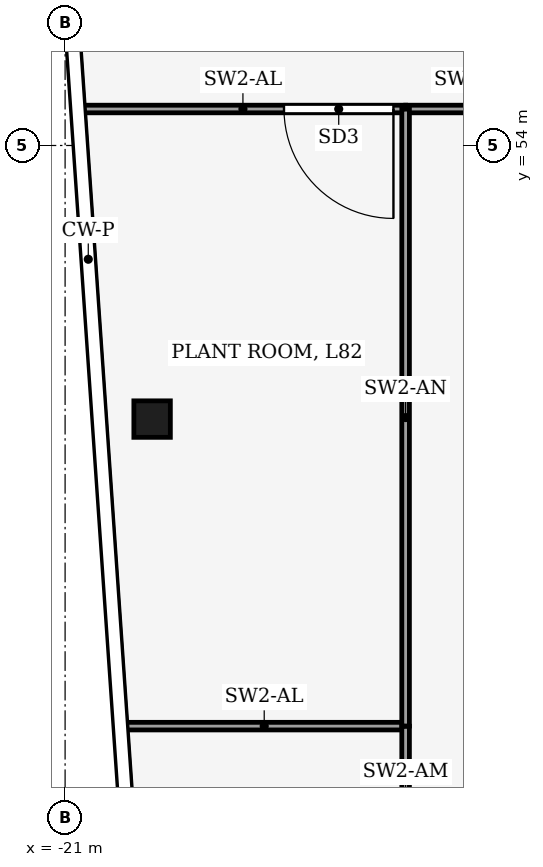
"""IFC4 building model, lengths in metres.
Left out: names, types, materials, properties, quantities, classifications, styles, units other than length and angle.
Written with IfcOpenShell. Run it as: python <this file> out.ifc"""

import sys

from ifc_helpers import new_model, si_unit, direction, frame, frame_2d, origin, origin_2d, place, context, subcontext, project, spatial, rectangle, hollow_rectangle, extrude, element, fill, save


model = new_model("IFC4")
c1 = context("Model", 3, precision=1e-05, world=origin(), true_north=direction((0.0, 1.0)))
c2 = subcontext(c1, "Body", "Model", "MODEL_VIEW")
j1 = project(units=[si_unit("LENGTHUNIT", "METRE"), si_unit("PLANEANGLEUNIT", "RADIAN")], contexts=[c1])
p1 = place(None, origin())
s1 = spatial("IfcSite", under=j1, at=p1, CompositionType="ELEMENT")
p2 = place(p1, origin())
s2 = spatial("IfcBuilding", under=s1, at=p2, CompositionType="ELEMENT")
p3 = place(p2, frame((0.0, 0.0, 364.0)))
s3 = spatial("IfcBuildingStorey", under=s2, at=p3, CompositionType="ELEMENT", Elevation=364.0)
p4 = place(p3, frame((-19.569, 49.5, 0.0), z_axis=(0.0, 0.0, 1.0), x_axis=(1.0, 0.0, 0.0)))
e1 = element("IfcColumn", 1, at=p4, inside=s3, PredefinedType="COLUMN", context=c2, shape_type="SweptSolid", body=[
    extrude(hollow_rectangle(XDim=0.6, YDim=0.6, WallThickness=0.025, at=origin_2d()), origin(), (0.0, 0.0, 1.0), 4.0),
])
p5 = place(p3, frame((-15.4, 54.6, 0.0), z_axis=(0.0, 0.0, 1.0), x_axis=(-1.0, 0.0, 0.0)))
e2 = element("IfcWall", 2, at=p5, inside=s3, PredefinedType="PARTITIONING", context=c2, shape_type="SweptSolid", body=[
    extrude(rectangle(XDim=5.351, YDim=0.125, at=frame_2d((2.675, 0.0))), origin(), (0.0, 0.0, 1.0), 3.02),
])
p6 = place(p5, frame((0.2, 0.0, 0.0)))
e3 = element("IfcOpeningElement", 3, at=p6, cuts=e2, PredefinedType="OPENING", context=c2, shape_type="SweptSolid", body=[
    extrude(rectangle(XDim=1.8, YDim=2.4, at=frame_2d((0.9, 1.2))), frame((0.0, 0.073, 0.0), z_axis=(0.0, -1.0, 0.0), x_axis=(1.0, 0.0, 0.0)), (0.0, 0.0, 1.0), 0.145),
])
p7 = place(p3, frame((-20.051, 44.45, 0.0), z_axis=(0.0, 0.0, 1.0), x_axis=(1.0, 0.0, 0.0)))
e4 = element("IfcWall", 4, at=p7, inside=s3, PredefinedType="PARTITIONING", context=c2, shape_type="SweptSolid", body=[
    extrude(rectangle(XDim=4.651, YDim=0.125, at=frame_2d((2.325, 0.0))), origin(), (0.0, 0.0, 1.0), 3.02),
])
p8 = place(p3, frame((-13.062, 54.6, 0.0), z_axis=(0.0, 0.0, 1.0), x_axis=(-1.0, 0.0, 0.0)))
e5 = element("IfcWall", 5, at=p8, inside=s3, PredefinedType="PARTITIONING", context=c2, shape_type="SweptSolid", body=[
    extrude(rectangle(XDim=2.335, YDim=0.125, at=frame_2d((1.168, 0.0))), origin(), (0.0, 0.0, 1.0), 3.85),
])
p9 = place(p3, frame((-15.4, 44.448, 0.0), z_axis=(0.0, 0.0, 1.0), x_axis=(0.0, -1.0, 0.0)))
e6 = element("IfcWall", 6, at=p9, inside=s3, PredefinedType="PARTITIONING", context=c2, shape_type="SweptSolid", body=[
    extrude(rectangle(XDim=2.446, YDim=0.125, at=frame_2d((1.223, 0.0))), origin(), (0.0, 0.0, 1.0), 3.85),
])
p10 = place(p3, frame((-15.4, 54.598, 0.0), z_axis=(0.0, 0.0, 1.0), x_axis=(0.0, -1.0, 0.0)))
e7 = element("IfcWall", 7, at=p10, inside=s3, PredefinedType="PARTITIONING", context=c2, shape_type="SweptSolid", body=[
    extrude(rectangle(XDim=10.146, YDim=0.125, at=frame_2d((5.073, 0.0))), origin(), (0.0, 0.0, 1.0), 3.33),
])
p11 = place(p6, origin())
e8 = element("IfcDoor", 8, at=p11, inside=s3, OperationType="DOUBLE_DOOR_SINGLE_SWING", PredefinedType="DOOR", context=c2, shape_type="SweptSolid", body=[
    extrude(rectangle(XDim=1.8, YDim=2.4, at=frame_2d((0.9, 1.2))), frame((0.0, 0.025, 0.0), z_axis=(0.0, -1.0, 0.0), x_axis=(1.0, 0.0, 0.0)), (0.0, 0.0, 1.0), 0.05),
])
fill(e3, e8)
save(model, sys.argv[1])
